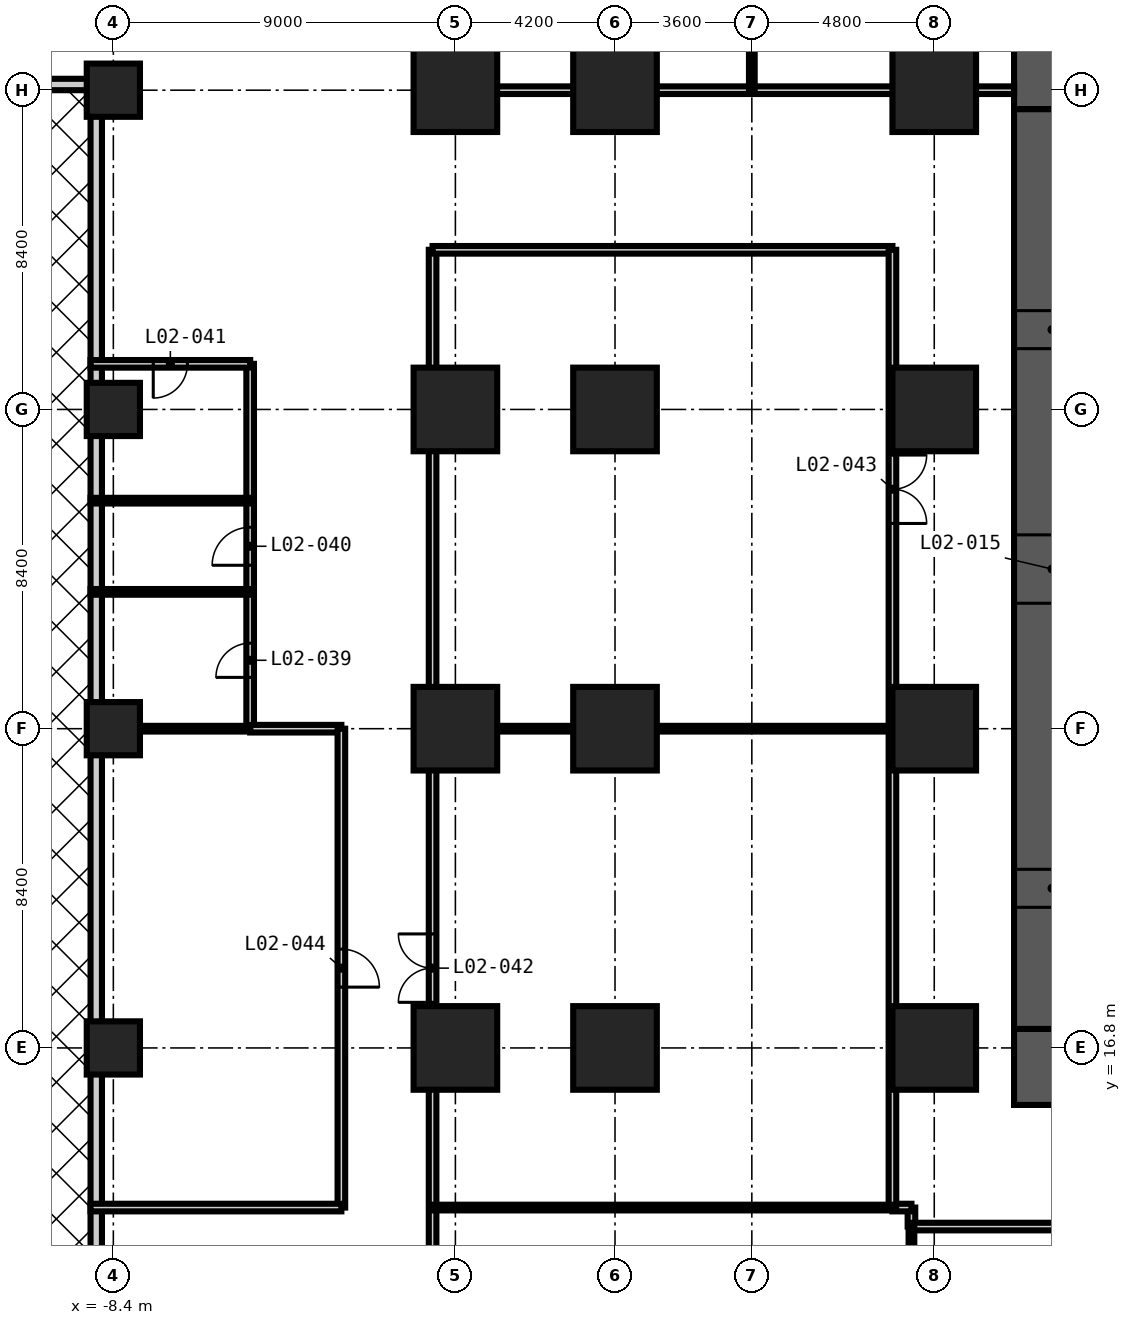
"""IFC4 building model, lengths in metres.
Left out: names, types, materials, properties, quantities, classifications, styles, units other than length and angle.
Written with IfcOpenShell. Run it as: python <this file> out.ifc"""

import sys

from ifc_helpers import new_model, si_unit, direction, frame, frame_2d, origin, origin_2d, place, context, subcontext, project, spatial, rectangle, extrude, element, fill, save


model = new_model("IFC4")
c1 = context("Model", 3, precision=1e-05, world=origin(), true_north=direction((0.0, 1.0)))
c2 = subcontext(c1, "Body", "Model", "MODEL_VIEW")
j1 = project(units=[si_unit("LENGTHUNIT", "METRE"), si_unit("PLANEANGLEUNIT", "RADIAN")], contexts=[c1])
p1 = place(None, origin())
s1 = spatial("IfcSite", under=j1, at=p1, CompositionType="ELEMENT")
p2 = place(p1, origin())
s2 = spatial("IfcBuilding", under=s1, at=p2, CompositionType="ELEMENT")
p3 = place(p2, frame((0.0, 0.0, 12.0)))
s3 = spatial("IfcBuildingStorey", under=s2, at=p3, CompositionType="ELEMENT", Elevation=12.0)
for number, where, z_axis, x_axis in (
    (1, (0.6, 16.8, -0.3), (0.0, 0.0, 1.0), (1.0, 0.0, 0.0)),
    (2, (0.6, 25.2, -0.3), (0.0, 0.0, 1.0), (1.0, 0.0, 0.0)),
    (3, (0.6, 33.6, -0.3), (0.0, 0.0, 1.0), (1.0, 0.0, 0.0)),
    (4, (0.6, 42.0, -0.3), (0.0, 0.0, 1.0), (1.0, 0.0, 0.0)),
    (5, (4.8, 16.8, -0.3), (0.0, 0.0, 1.0), (1.0, 0.0, 0.0)),
    (6, (4.8, 25.2, -0.3), (0.0, 0.0, 1.0), (1.0, 0.0, 0.0)),
    (7, (4.8, 33.6, -0.3), (0.0, 0.0, 1.0), (1.0, 0.0, 0.0)),
    (8, (4.8, 42.0, -0.3), (0.0, 0.0, 1.0), (1.0, 0.0, 0.0)),
    (9, (13.2, 16.8, -0.3), (0.0, 0.0, 1.0), (1.0, 0.0, 0.0)),
    (10, (13.2, 25.2, -0.3), (0.0, 0.0, 1.0), (1.0, 0.0, 0.0)),
    (11, (13.2, 33.6, -0.3), (0.0, 0.0, 1.0), (1.0, 0.0, 0.0)),
    (12, (13.2, 42.0, -0.3), (0.0, 0.0, 1.0), (1.0, 0.0, 0.0)),
):
    element("IfcColumn", number, at=place(p3, frame(where, z_axis=z_axis, x_axis=x_axis)), inside=s3, PredefinedType="COLUMN", context=c2, shape_type="SweptSolid", body=[
        extrude(rectangle(XDim=2.2, YDim=2.2, at=origin_2d()), origin(), (0.0, 0.0, 1.0), 5.0),
    ])
for number, where, z_axis, x_axis in (
    (13, (-8.4, 16.8, -0.3), (0.0, 0.0, 1.0), (1.0, 0.0, 0.0)),
    (14, (-8.4, 25.2, -0.3), (0.0, 0.0, 1.0), (1.0, 0.0, 0.0)),
    (15, (-8.4, 33.6, -0.3), (0.0, 0.0, 1.0), (1.0, 0.0, 0.0)),
    (16, (-8.4, 42.0, -0.3), (0.0, 0.0, 1.0), (1.0, 0.0, 0.0)),
):
    element("IfcColumn", number, at=place(p3, frame(where, z_axis=z_axis, x_axis=x_axis)), inside=s3, PredefinedType="COLUMN", context=c2, shape_type="SweptSolid", body=[
        extrude(rectangle(XDim=1.4, YDim=1.4, at=origin_2d()), origin(), (0.0, 0.0, 1.0), 5.0),
    ])
p4 = place(p3, frame((15.3, 16.3, -0.3), z_axis=(0.0, 0.0, 1.0), x_axis=(1.0, 0.0, 0.0)))
e17 = element("IfcWall", 17, at=p4, inside=s3, PredefinedType="SHEAR", context=c2, shape_type="SweptSolid", body=[
    extrude(rectangle(XDim=28.2, YDim=2.0, at=frame_2d((14.1, 0.0))), origin(), (0.0, 0.0, 1.0), 5.0),
])
p5 = place(p4, frame((13.6, 0.0, 0.3)))
e18 = element("IfcOpeningElement", 18, at=p5, cuts=e17, PredefinedType="OPENING", context=c2, shape_type="SweptSolid", body=[
    extrude(rectangle(XDim=1.0, YDim=2.1, at=frame_2d((0.5, 1.05))), frame((0.0, 1.01, 0.0), z_axis=(0.0, -1.0, 0.0), x_axis=(1.0, 0.0, 0.0)), (0.0, 0.0, 1.0), 2.02),
])
p6 = place(p4, frame((19.9, 0.0, 0.3)))
e19 = element("IfcOpeningElement", 19, at=p6, cuts=e17, PredefinedType="OPENING", context=c2, shape_type="SweptSolid", body=[
    extrude(rectangle(XDim=1.0, YDim=2.1, at=frame_2d((0.5, 1.05))), frame((0.0, 1.01, 0.0), z_axis=(0.0, -1.0, 0.0), x_axis=(1.0, 0.0, 0.0)), (0.0, 0.0, 1.0), 2.02),
])
p7 = place(p3, frame((43.5, 42.5, -0.3), z_axis=(0.0, 0.0, 1.0), x_axis=(-1.0, 0.0, 0.0)))
e20 = element("IfcWall", 20, at=p7, inside=s3, PredefinedType="SHEAR", context=c2, shape_type="SweptSolid", body=[
    extrude(rectangle(XDim=28.2, YDim=2.0, at=frame_2d((14.1, 0.0))), origin(), (0.0, 0.0, 1.0), 5.0),
])
p8 = place(p7, frame((21.4, 0.0, 0.3)))
e21 = element("IfcOpeningElement", 21, at=p8, cuts=e20, PredefinedType="OPENING", context=c2, shape_type="SweptSolid", body=[
    extrude(rectangle(XDim=1.0, YDim=2.1, at=frame_2d((0.5, 1.05))), frame((0.0, 1.01, 0.0), z_axis=(0.0, -1.0, 0.0), x_axis=(1.0, 0.0, 0.0)), (0.0, 0.0, 1.0), 2.02),
])
p9 = place(p7, frame((11.4, 0.0, 0.3)))
e22 = element("IfcOpeningElement", 22, at=p9, cuts=e20, PredefinedType="OPENING", context=c2, shape_type="SweptSolid", body=[
    extrude(rectangle(XDim=1.2, YDim=2.2, at=frame_2d((0.6, 1.1))), frame((0.0, 1.01, 0.0), z_axis=(0.0, -1.0, 0.0), x_axis=(1.0, 0.0, 0.0)), (0.0, 0.0, 1.0), 2.02),
])
p10 = place(p3, frame((16.3, 41.5, -0.3), z_axis=(0.0, 0.0, 1.0), x_axis=(0.0, -1.0, 0.0)))
e23 = element("IfcWall", 23, at=p10, inside=s3, PredefinedType="SHEAR", context=c2, shape_type="SweptSolid", body=[
    extrude(rectangle(XDim=24.2, YDim=2.0, at=frame_2d((12.1, 0.0))), origin(), (0.0, 0.0, 1.0), 5.0),
])
p11 = place(p10, frame((11.2, 0.0, 0.3)))
e24 = element("IfcOpeningElement", 24, at=p11, cuts=e23, PredefinedType="OPENING", context=c2, shape_type="SweptSolid", body=[
    extrude(rectangle(XDim=1.8, YDim=2.2, at=frame_2d((0.9, 1.1))), frame((0.0, 1.01, 0.0), z_axis=(0.0, -1.0, 0.0), x_axis=(1.0, 0.0, 0.0)), (0.0, 0.0, 1.0), 2.02),
])
p12 = place(p10, frame((20.0, 0.0, 0.3)))
e25 = element("IfcOpeningElement", 25, at=p12, cuts=e23, PredefinedType="OPENING", context=c2, shape_type="SweptSolid", body=[
    extrude(rectangle(XDim=1.0, YDim=2.1, at=frame_2d((0.5, 1.05))), frame((0.0, 1.01, 0.0), z_axis=(0.0, -1.0, 0.0), x_axis=(1.0, 0.0, 0.0)), (0.0, 0.0, 1.0), 2.02),
])
p13 = place(p10, frame((5.3, 0.0, 0.3)))
e26 = element("IfcOpeningElement", 26, at=p13, cuts=e23, PredefinedType="OPENING", context=c2, shape_type="SweptSolid", body=[
    extrude(rectangle(XDim=1.0, YDim=2.1, at=frame_2d((0.5, 1.05))), frame((0.0, 1.01, 0.0), z_axis=(0.0, -1.0, 0.0), x_axis=(1.0, 0.0, 0.0)), (0.0, 0.0, 1.0), 2.02),
])
p14 = place(p3, frame((-33.6, 42.15, 0.0), z_axis=(0.0, 0.0, 1.0), x_axis=(1.0, 0.0, 0.0)))
e27 = element("IfcWall", 27, at=p14, inside=s3, PredefinedType="PARTITIONING", context=c2, shape_type="SweptSolid", body=[
    extrude(rectangle(XDim=24.6, YDim=0.3, at=frame_2d((12.3, 0.0))), origin(), (0.0, 0.0, 1.0), 3.779),
])
p15 = place(p3, frame((-8.85, 42.0, 0.0), z_axis=(0.0, 0.0, 1.0), x_axis=(0.0, -1.0, 0.0)))
e28 = element("IfcWall", 28, at=p15, inside=s3, PredefinedType="PARTITIONING", context=c2, shape_type="SweptSolid", body=[
    extrude(rectangle(XDim=33.6, YDim=0.3, at=frame_2d((16.8, 0.0))), origin(), (0.0, 0.0, 1.0), 4.7),
])
p16 = place(p3, frame((-4.8, 25.2, 0.0), z_axis=(0.0, 0.0, 1.0), x_axis=(0.0, 1.0, 0.0)))
e29 = element("IfcWall", 29, at=p16, inside=s3, PredefinedType="PARTITIONING", context=c2, shape_type="SweptSolid", body=[
    extrude(rectangle(XDim=9.6, YDim=0.2, at=frame_2d((4.8, 0.0))), origin(), (0.0, 0.0, 1.0), 4.7),
])
p17 = place(p16, frame((1.35, 0.0, 0.0)))
e30 = element("IfcOpeningElement", 30, at=p17, cuts=e29, PredefinedType="OPENING", context=c2, shape_type="SweptSolid", body=[
    extrude(rectangle(XDim=0.9, YDim=2.1, at=frame_2d((0.45, 1.05))), frame((0.0, 0.11, 0.0), z_axis=(0.0, -1.0, 0.0), x_axis=(1.0, 0.0, 0.0)), (0.0, 0.0, 1.0), 0.22),
])
p18 = place(p16, frame((4.3, 0.0, 0.0)))
e31 = element("IfcOpeningElement", 31, at=p18, cuts=e29, PredefinedType="OPENING", context=c2, shape_type="SweptSolid", body=[
    extrude(rectangle(XDim=1.0, YDim=2.1, at=frame_2d((0.5, 1.05))), frame((0.0, 0.11, 0.0), z_axis=(0.0, -1.0, 0.0), x_axis=(1.0, 0.0, 0.0)), (0.0, 0.0, 1.0), 0.22),
])
p19 = place(p3, frame((0.0, 4.2, 0.0), z_axis=(0.0, 0.0, 1.0), x_axis=(0.0, 1.0, 0.0)))
e32 = element("IfcWall", 32, at=p19, inside=s3, PredefinedType="PARTITIONING", context=c2, shape_type="SweptSolid", body=[
    extrude(rectangle(XDim=33.6, YDim=0.2, at=frame_2d((16.8, 0.0))), origin(), (0.0, 0.0, 1.0), 4.7),
])
p20 = place(p19, frame((13.8, 0.0, 0.0)))
e33 = element("IfcOpeningElement", 33, at=p20, cuts=e32, PredefinedType="OPENING", context=c2, shape_type="SweptSolid", body=[
    extrude(rectangle(XDim=1.8, YDim=2.4, at=frame_2d((0.9, 1.2))), frame((0.0, 0.11, 0.0), z_axis=(0.0, -1.0, 0.0), x_axis=(1.0, 0.0, 0.0)), (0.0, 0.0, 1.0), 0.22),
])
p21 = place(p3, frame((0.0, 42.0, 0.0), z_axis=(0.0, 0.0, 1.0), x_axis=(0.0, 1.0, 0.0)))
e34 = element("IfcWall", 34, at=p21, inside=s3, PredefinedType="PARTITIONING", context=c2, shape_type="SweptSolid", body=[
    extrude(rectangle(XDim=16.8, YDim=0.2, at=frame_2d((8.4, 0.0))), origin(), (0.0, 0.0, 1.0), 4.7),
])
p22 = place(p21, frame((9.6, 0.0, 0.0)))
e35 = element("IfcOpeningElement", 35, at=p22, cuts=e34, PredefinedType="OPENING", context=c2, shape_type="SweptSolid", body=[
    extrude(rectangle(XDim=1.8, YDim=2.4, at=frame_2d((0.9, 1.2))), frame((0.0, 0.11, 0.0), z_axis=(0.0, -1.0, 0.0), x_axis=(1.0, 0.0, 0.0)), (0.0, 0.0, 1.0), 0.22),
])
p23 = place(p3, frame((12.6, 12.1, 0.0), z_axis=(0.0, 0.0, 1.0), x_axis=(0.0, 1.0, 0.0)))
e36 = element("IfcWall", 36, at=p23, inside=s3, PredefinedType="PARTITIONING", context=c2, shape_type="SweptSolid", body=[
    extrude(rectangle(XDim=0.5, YDim=0.2, at=frame_2d((0.25, 0.0))), origin(), (0.0, 0.0, 1.0), 4.7),
])
p24 = place(p3, frame((12.6, 12.1, 0.0), z_axis=(0.0, 0.0, 1.0), x_axis=(1.0, 0.0, 0.0)))
e37 = element("IfcWall", 37, at=p24, inside=s3, PredefinedType="PARTITIONING", context=c2, shape_type="SweptSolid", body=[
    extrude(rectangle(XDim=33.6, YDim=0.2, at=frame_2d((16.8, 0.0))), origin(), (0.0, 0.0, 1.0), 4.7),
])
p25 = place(p3, frame((12.1, 12.6, 0.0), z_axis=(0.0, 0.0, 1.0), x_axis=(1.0, 0.0, 0.0)))
e38 = element("IfcWall", 38, at=p25, inside=s3, PredefinedType="PARTITIONING", context=c2, shape_type="SweptSolid", body=[
    extrude(rectangle(XDim=0.5, YDim=0.2, at=frame_2d((0.25, 0.0))), origin(), (0.0, 0.0, 1.0), 4.7),
])
p26 = place(p3, frame((-4.8, 25.2, 0.0), z_axis=(0.0, 0.0, 1.0), x_axis=(1.0, 0.0, 0.0)))
e39 = element("IfcWall", 39, at=p26, inside=s3, PredefinedType="PARTITIONING", context=c2, shape_type="SweptSolid", body=[
    extrude(rectangle(XDim=2.4, YDim=0.2, at=frame_2d((1.2, 0.0))), origin(), (0.0, 0.0, 1.0), 4.7),
])
p27 = place(p3, frame((-9.0, 34.8, 0.0), z_axis=(0.0, 0.0, 1.0), x_axis=(1.0, 0.0, 0.0)))
e40 = element("IfcWall", 40, at=p27, inside=s3, PredefinedType="PARTITIONING", context=c2, shape_type="SweptSolid", body=[
    extrude(rectangle(XDim=4.2, YDim=0.2, at=frame_2d((2.1, 0.0))), origin(), (0.0, 0.0, 1.0), 4.7),
])
p28 = place(p27, frame((1.65, 0.0, 0.0)))
e41 = element("IfcOpeningElement", 41, at=p28, cuts=e40, PredefinedType="OPENING", context=c2, shape_type="SweptSolid", body=[
    extrude(rectangle(XDim=0.9, YDim=2.1, at=frame_2d((0.45, 1.05))), frame((0.0, 0.11, 0.0), z_axis=(0.0, -1.0, 0.0), x_axis=(1.0, 0.0, 0.0)), (0.0, 0.0, 1.0), 0.22),
])
p29 = place(p3, frame((0.0, 37.8, 0.0), z_axis=(0.0, 0.0, 1.0), x_axis=(1.0, 0.0, 0.0)))
e42 = element("IfcWall", 42, at=p29, inside=s3, PredefinedType="PARTITIONING", context=c2, shape_type="SweptSolid", body=[
    extrude(rectangle(XDim=12.1, YDim=0.2, at=frame_2d((6.05, 0.0))), origin(), (0.0, 0.0, 1.0), 4.7),
])
p30 = place(p3, frame((-2.4, 25.2, 0.0), z_axis=(0.0, 0.0, 1.0), x_axis=(0.0, -1.0, 0.0)))
e43 = element("IfcWall", 43, at=p30, inside=s3, PredefinedType="PARTITIONING", context=c2, shape_type="SweptSolid", body=[
    extrude(rectangle(XDim=12.6, YDim=0.2, at=frame_2d((6.3, 0.0))), origin(), (0.0, 0.0, 1.0), 4.7),
])
p31 = place(p30, frame((5.8, 0.0, 0.0)))
e44 = element("IfcOpeningElement", 44, at=p31, cuts=e43, PredefinedType="OPENING", context=c2, shape_type="SweptSolid", body=[
    extrude(rectangle(XDim=1.0, YDim=2.1, at=frame_2d((0.5, 1.05))), frame((0.0, 0.11, 0.0), z_axis=(0.0, -1.0, 0.0), x_axis=(1.0, 0.0, 0.0)), (0.0, 0.0, 1.0), 0.22),
])
p32 = place(p3, frame((12.1, 37.8, 0.0), z_axis=(0.0, 0.0, 1.0), x_axis=(0.0, -1.0, 0.0)))
e45 = element("IfcWall", 45, at=p32, inside=s3, PredefinedType="PARTITIONING", context=c2, shape_type="SweptSolid", body=[
    extrude(rectangle(XDim=25.2, YDim=0.2, at=frame_2d((12.6, 0.0))), origin(), (0.0, 0.0, 1.0), 4.7),
])
p33 = place(p32, frame((5.4, 0.0, 0.0)))
e46 = element("IfcOpeningElement", 46, at=p33, cuts=e45, PredefinedType="OPENING", context=c2, shape_type="SweptSolid", body=[
    extrude(rectangle(XDim=1.8, YDim=2.4, at=frame_2d((0.9, 1.2))), frame((0.0, 0.11, 0.0), z_axis=(0.0, -1.0, 0.0), x_axis=(1.0, 0.0, 0.0)), (0.0, 0.0, 1.0), 0.22),
])
p34 = place(p3, frame((-2.4, 12.6, 0.0), z_axis=(0.0, 0.0, 1.0), x_axis=(-1.0, 0.0, 0.0)))
e47 = element("IfcWall", 47, at=p34, inside=s3, PredefinedType="PARTITIONING", context=c2, shape_type="SweptSolid", body=[
    extrude(rectangle(XDim=6.6, YDim=0.2, at=frame_2d((3.3, 0.0))), origin(), (0.0, 0.0, 1.0), 4.7),
])
p35 = place(p3, frame((15.3, 42.0, 0.0), z_axis=(0.0, 0.0, 1.0), x_axis=(-1.0, 0.0, 0.0)))
e48 = element("IfcWall", 48, at=p35, inside=s3, PredefinedType="PARTITIONING", context=c2, shape_type="SweptSolid", body=[
    extrude(rectangle(XDim=15.3, YDim=0.2, at=frame_2d((7.65, 0.0))), origin(), (0.0, 0.0, 1.0), 4.7),
])
p36 = place(p3, frame((8.4, 42.0, 0.0), z_axis=(0.0, 0.0, 1.0), x_axis=(0.0, 1.0, 0.0)))
e49 = element("IfcWall", 49, at=p36, inside=s3, PredefinedType="PARTITIONING", context=c2, shape_type="SweptSolid", body=[
    extrude(rectangle(XDim=16.8, YDim=0.15, at=frame_2d((8.4, 0.0))), origin(), (0.0, 0.0, 1.0), 4.7),
])
p37 = place(p3, frame((12.6, 4.2, 0.0), z_axis=(0.0, 0.0, 1.0), x_axis=(0.0, 1.0, 0.0)))
e50 = element("IfcWall", 50, at=p37, inside=s3, PredefinedType="PARTITIONING", context=c2, shape_type="SweptSolid", body=[
    extrude(rectangle(XDim=7.9, YDim=0.15, at=frame_2d((3.95, 0.0))), origin(), (0.0, 0.0, 1.0), 4.7),
])
p38 = place(p3, frame((0.0, 12.6, 0.0), z_axis=(0.0, 0.0, 1.0), x_axis=(1.0, 0.0, 0.0)))
e51 = element("IfcWall", 51, at=p38, inside=s3, PredefinedType="PARTITIONING", context=c2, shape_type="SweptSolid", body=[
    extrude(rectangle(XDim=12.1, YDim=0.15, at=frame_2d((6.05, 0.0))), origin(), (0.0, 0.0, 1.0), 4.7),
])
p39 = place(p3, frame((-9.0, 25.2, 0.0), z_axis=(0.0, 0.0, 1.0), x_axis=(1.0, 0.0, 0.0)))
e52 = element("IfcWall", 52, at=p39, inside=s3, PredefinedType="PARTITIONING", context=c2, shape_type="SweptSolid", body=[
    extrude(rectangle(XDim=4.2, YDim=0.15, at=frame_2d((2.1, 0.0))), origin(), (0.0, 0.0, 1.0), 4.7),
])
p40 = place(p3, frame((0.0, 25.2, 0.0), z_axis=(0.0, 0.0, 1.0), x_axis=(1.0, 0.0, 0.0)))
e53 = element("IfcWall", 53, at=p40, inside=s3, PredefinedType="PARTITIONING", context=c2, shape_type="SweptSolid", body=[
    extrude(rectangle(XDim=12.1, YDim=0.15, at=frame_2d((6.05, 0.0))), origin(), (0.0, 0.0, 1.0), 4.7),
])
for number, where, z_axis, x_axis in (
    (54, (-9.0, 28.8, 0.0), (0.0, 0.0, 1.0), (1.0, 0.0, 0.0)),
    (55, (-9.0, 31.2, 0.0), (0.0, 0.0, 1.0), (1.0, 0.0, 0.0)),
):
    element("IfcWall", number, at=place(p3, frame(where, z_axis=z_axis, x_axis=x_axis)), inside=s3, PredefinedType="PARTITIONING", context=c2, shape_type="SweptSolid", body=[
        extrude(rectangle(XDim=4.2, YDim=0.15, at=frame_2d((2.1, 0.0))), origin(), (0.0, 0.0, 1.0), 4.7),
    ])
p41 = place(p11, origin())
e56 = element("IfcDoor", 56, at=p41, inside=s3, OperationType="DOUBLE_DOOR_DOUBLE_SWING", PredefinedType="DOOR", context=c2, shape_type="SweptSolid", body=[
    extrude(rectangle(XDim=1.8, YDim=2.2, at=frame_2d((0.9, 1.1))), frame((0.0, 0.025, 0.0), z_axis=(0.0, -1.0, 0.0), x_axis=(1.0, 0.0, 0.0)), (0.0, 0.0, 1.0), 0.05),
])
fill(e24, e56)
p42 = place(p12, origin())
e57 = element("IfcDoor", 57, at=p42, inside=s3, OperationType="SINGLE_SWING_LEFT", PredefinedType="DOOR", context=c2, shape_type="SweptSolid", body=[
    extrude(rectangle(XDim=1.0, YDim=2.1, at=frame_2d((0.5, 1.05))), frame((0.0, 0.025, 0.0), z_axis=(0.0, -1.0, 0.0), x_axis=(1.0, 0.0, 0.0)), (0.0, 0.0, 1.0), 0.05),
])
fill(e25, e57)
p43 = place(p13, origin())
e58 = element("IfcDoor", 58, at=p43, inside=s3, OperationType="SINGLE_SWING_RIGHT", PredefinedType="DOOR", context=c2, shape_type="SweptSolid", body=[
    extrude(rectangle(XDim=1.0, YDim=2.1, at=frame_2d((0.5, 1.05))), frame((0.0, 0.025, 0.0), z_axis=(0.0, -1.0, 0.0), x_axis=(1.0, 0.0, 0.0)), (0.0, 0.0, 1.0), 0.05),
])
fill(e26, e58)
p44 = place(p17, origin())
e59 = element("IfcDoor", 59, at=p44, inside=s3, OperationType="SINGLE_SWING_LEFT", PredefinedType="DOOR", context=c2, shape_type="SweptSolid", body=[
    extrude(rectangle(XDim=0.9, YDim=2.1, at=frame_2d((0.45, 1.05))), frame((0.0, 0.025, 0.0), z_axis=(0.0, -1.0, 0.0), x_axis=(1.0, 0.0, 0.0)), (0.0, 0.0, 1.0), 0.05),
])
fill(e30, e59)
p45 = place(p18, origin())
e60 = element("IfcDoor", 60, at=p45, inside=s3, OperationType="SINGLE_SWING_LEFT", PredefinedType="DOOR", context=c2, shape_type="SweptSolid", body=[
    extrude(rectangle(XDim=1.0, YDim=2.1, at=frame_2d((0.5, 1.05))), frame((0.0, 0.025, 0.0), z_axis=(0.0, -1.0, 0.0), x_axis=(1.0, 0.0, 0.0)), (0.0, 0.0, 1.0), 0.05),
])
fill(e31, e60)
p46 = place(p28, frame((0.9, 0.0, 0.0), z_axis=(0.0, 0.0, 1.0), x_axis=(-1.0, 0.0, 0.0)))
e61 = element("IfcDoor", 61, at=p46, inside=s3, OperationType="SINGLE_SWING_RIGHT", PredefinedType="DOOR", context=c2, shape_type="SweptSolid", body=[
    extrude(rectangle(XDim=0.9, YDim=2.1, at=frame_2d((0.45, 1.05))), frame((0.0, 0.025, 0.0), z_axis=(0.0, -1.0, 0.0), x_axis=(1.0, 0.0, 0.0)), (0.0, 0.0, 1.0), 0.05),
])
fill(e41, e61)
p47 = place(p20, origin())
e62 = element("IfcDoor", 62, at=p47, inside=s3, OperationType="DOUBLE_DOOR_DOUBLE_SWING", PredefinedType="DOOR", context=c2, shape_type="SweptSolid", body=[
    extrude(rectangle(XDim=1.8, YDim=2.4, at=frame_2d((0.9, 1.2))), frame((0.0, 0.025, 0.0), z_axis=(0.0, -1.0, 0.0), x_axis=(1.0, 0.0, 0.0)), (0.0, 0.0, 1.0), 0.05),
])
fill(e33, e62)
p48 = place(p33, origin())
e63 = element("IfcDoor", 63, at=p48, inside=s3, OperationType="DOUBLE_DOOR_DOUBLE_SWING", PredefinedType="DOOR", context=c2, shape_type="SweptSolid", body=[
    extrude(rectangle(XDim=1.8, YDim=2.4, at=frame_2d((0.9, 1.2))), frame((0.0, 0.025, 0.0), z_axis=(0.0, -1.0, 0.0), x_axis=(1.0, 0.0, 0.0)), (0.0, 0.0, 1.0), 0.05),
])
fill(e46, e63)
p49 = place(p31, origin())
e64 = element("IfcDoor", 64, at=p49, inside=s3, OperationType="SINGLE_SWING_RIGHT", PredefinedType="DOOR", context=c2, shape_type="SweptSolid", body=[
    extrude(rectangle(XDim=1.0, YDim=2.1, at=frame_2d((0.5, 1.05))), frame((0.0, 0.025, 0.0), z_axis=(0.0, -1.0, 0.0), x_axis=(1.0, 0.0, 0.0)), (0.0, 0.0, 1.0), 0.05),
])
fill(e44, e64)
save(model, sys.argv[1])
